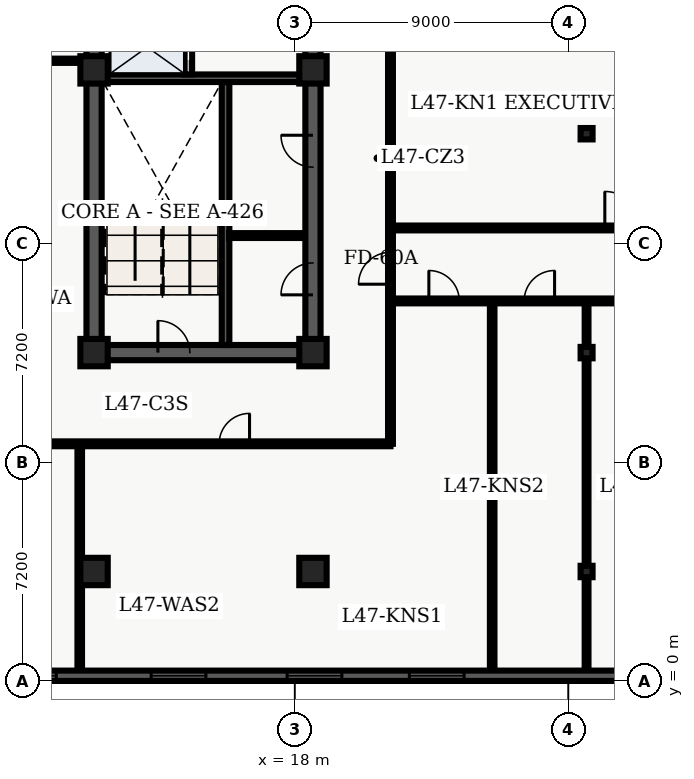
"""IFC4 building model, lengths in metres.
Left out: names, types, materials, properties, quantities, classifications, styles, units other than length and angle.
Written with IfcOpenShell. Run it as: python <this file> out.ifc"""

import sys

from ifc_helpers import new_model, entity, si_unit, converted_unit, direction, frame, origin_with_axes, origin_2d_with_axis, place, context, subcontext, project, spatial, polyline, rectangle, i_section, outline, extrude, element, fill, save


model = new_model("IFC4")
c1 = context("Model", 3, precision=1e-05, world=origin_with_axes(), true_north=direction((0.0, 1.0)))
c2 = subcontext(c1, "Body", "Model", "MODEL_VIEW")
j1 = project(units=[si_unit("LENGTHUNIT", "METRE"), converted_unit("PLANEANGLEUNIT", "DEGREE", entity("IfcPlaneAngleMeasure", 0.017), si_unit("PLANEANGLEUNIT", "RADIAN"), dimensions=[0, 0, 0, 0, 0, 0, 0])], contexts=[c1])
p1 = place(None, origin_with_axes())
s1 = spatial("IfcSite", under=j1, at=p1, CompositionType="ELEMENT")
p2 = place(p1, origin_with_axes())
s2 = spatial("IfcBuilding", under=s1, at=p2, CompositionType="ELEMENT")
p3 = place(p2, frame((0.0, 0.0, 192.6), z_axis=(0.0, 0.0, 1.0), x_axis=(1.0, 0.0, 0.0)))
s3 = spatial("IfcBuildingStorey", under=s2, at=p3, CompositionType="ELEMENT", Elevation=192.6)
p4 = place(p3, frame((11.4, 10.8, 0.0), z_axis=(0.0, 0.0, 1.0), x_axis=(0.0, 1.0, 0.0)))
e1 = element("IfcWall", 1, at=p4, inside=s3, PredefinedType="SHEAR", context=c2, shape_type="SweptSolid", body=[
    extrude(outline(polyline([(0.0, -0.25), (27.0, -0.25), (27.0, 0.25), (0.0, 0.25), (0.0, -0.25)])), origin_with_axes(), (0.0, 0.0, 1.0), 3.66),
])
p5 = place(p3, frame((11.4, 10.8, 0.0), z_axis=(0.0, 0.0, 1.0), x_axis=(1.0, 0.0, 0.0)))
e2 = element("IfcWall", 2, at=p5, inside=s3, PredefinedType="SHEAR", context=c2, shape_type="SweptSolid", body=[
    extrude(outline(polyline([(0.0, -0.25), (7.2, -0.25), (7.2, 0.25), (0.0, 0.25), (0.0, -0.25)])), origin_with_axes(), (0.0, 0.0, 1.0), 3.66),
])
p6 = place(p5, frame((2.625, 0.0, 0.0), z_axis=(0.0, 0.0, 1.0), x_axis=(1.0, 0.0, 0.0)))
e3 = element("IfcOpeningElement", 3, at=p6, cuts=e2, PredefinedType="OPENING", context=c2, shape_type="SweptSolid", body=[
    extrude(rectangle(XDim=1.05, YDim=0.52, at=origin_2d_with_axis()), origin_with_axes(), (0.0, 0.0, 1.0), 2.15),
])
p7 = place(p3, frame((18.6, 10.8, 0.0), z_axis=(0.0, 0.0, 1.0), x_axis=(0.0, 1.0, 0.0)))
e4 = element("IfcWall", 4, at=p7, inside=s3, PredefinedType="SHEAR", context=c2, shape_type="SweptSolid", body=[
    extrude(outline(polyline([(0.0, -0.25), (13.5, -0.25), (13.5, 0.25), (0.0, 0.25), (0.0, -0.25)])), origin_with_axes(), (0.0, 0.0, 1.0), 3.66),
])
p8 = place(p7, frame((11.125, 0.0, 0.0), z_axis=(0.0, 0.0, 1.0), x_axis=(1.0, 0.0, 0.0)))
e5 = element("IfcOpeningElement", 5, at=p8, cuts=e4, PredefinedType="OPENING", context=c2, shape_type="SweptSolid", body=[
    extrude(rectangle(XDim=1.05, YDim=0.52, at=origin_2d_with_axis()), origin_with_axes(), (0.0, 0.0, 1.0), 2.15),
])
p9 = place(p7, frame((2.425, 0.0, 0.0), z_axis=(0.0, 0.0, 1.0), x_axis=(1.0, 0.0, 0.0)))
e6 = element("IfcOpeningElement", 6, at=p9, cuts=e4, PredefinedType="OPENING", context=c2, shape_type="SweptSolid", body=[
    extrude(rectangle(XDim=1.05, YDim=0.52, at=origin_2d_with_axis()), origin_with_axes(), (0.0, 0.0, 1.0), 2.15),
])
p10 = place(p7, frame((6.625, 0.0, 0.0), z_axis=(0.0, 0.0, 1.0), x_axis=(1.0, 0.0, 0.0)))
e7 = element("IfcOpeningElement", 7, at=p10, cuts=e4, PredefinedType="OPENING", context=c2, shape_type="SweptSolid", body=[
    extrude(rectangle(XDim=1.05, YDim=0.52, at=origin_2d_with_axis()), origin_with_axes(), (0.0, 0.0, 1.0), 2.15),
])
p11 = place(p3, frame((15.725, 11.05, 0.0), z_axis=(0.0, 0.0, 1.0), x_axis=(0.0, 1.0, 0.0)))
e8 = element("IfcWall", 8, at=p11, inside=s3, PredefinedType="SHEAR", context=c2, shape_type="SweptSolid", body=[
    extrude(outline(polyline([(0.0, -0.125), (8.65, -0.125), (8.65, 0.125), (0.0, 0.125), (0.0, -0.125)])), origin_with_axes(), (0.0, 0.0, 1.0), 3.66),
])
p12 = place(p3, frame((11.65, 19.825, 0.0), z_axis=(0.0, 0.0, 1.0), x_axis=(1.0, 0.0, 0.0)))
e9 = element("IfcWall", 9, at=p12, inside=s3, PredefinedType="SHEAR", context=c2, shape_type="SweptSolid", body=[
    extrude(outline(polyline([(0.0, -0.125), (6.7, -0.125), (6.7, 0.125), (0.0, 0.125), (0.0, -0.125)])), origin_with_axes(), (0.0, 0.0, 1.0), 3.66),
])
p13 = place(p3, frame((14.5, 19.95, 0.0), z_axis=(0.0, 0.0, 1.0), x_axis=(0.0, 1.0, 0.0)))
e10 = element("IfcWall", 10, at=p13, inside=s3, PredefinedType="SOLIDWALL", context=c2, shape_type="SweptSolid", body=[
    extrude(outline(polyline([(0.0, -0.125), (6.25, -0.125), (6.25, 0.125), (0.0, 0.125), (0.0, -0.125)])), origin_with_axes(), (0.0, 0.0, 1.0), 2.7),
])
p14 = place(p13, frame((1.025, 0.0, 0.0), z_axis=(0.0, 0.0, 1.0), x_axis=(1.0, 0.0, 0.0)))
e11 = element("IfcOpeningElement", 11, at=p14, cuts=e10, PredefinedType="OPENING", context=c2, shape_type="SweptSolid", body=[
    extrude(rectangle(XDim=1.1, YDim=0.27, at=origin_2d_with_axis()), origin_with_axes(), (0.0, 0.0, 1.0), 2.15),
])
p15 = place(p13, frame((2.975, 0.0, 0.0), z_axis=(0.0, 0.0, 1.0), x_axis=(1.0, 0.0, 0.0)))
e12 = element("IfcOpeningElement", 12, at=p15, cuts=e10, PredefinedType="OPENING", context=c2, shape_type="SweptSolid", body=[
    extrude(rectangle(XDim=1.1, YDim=0.27, at=origin_2d_with_axis()), origin_with_axes(), (0.0, 0.0, 1.0), 2.15),
])
p16 = place(p13, frame((5.425, 0.0, 0.0), z_axis=(0.0, 0.0, 1.0), x_axis=(1.0, 0.0, 0.0)))
e13 = element("IfcOpeningElement", 13, at=p16, cuts=e10, PredefinedType="OPENING", context=c2, shape_type="SweptSolid", body=[
    extrude(rectangle(XDim=1.2, YDim=0.27, at=origin_2d_with_axis()), origin_with_axes(), (0.0, 0.0, 1.0), 2.15),
])
for number, where, z_axis, x_axis in (
    (14, (11.4, 3.6, 0.0), (0.0, 0.0, 1.0), (1.0, 0.0, 0.0)),
    (15, (11.4, 10.8, 0.0), (0.0, 0.0, 1.0), (1.0, 0.0, 0.0)),
    (16, (11.4, 20.1, 0.0), (0.0, 0.0, 1.0), (1.0, 0.0, 0.0)),
    (17, (18.6, 3.6, 0.0), (0.0, 0.0, 1.0), (1.0, 0.0, 0.0)),
    (18, (18.6, 10.8, 0.0), (0.0, 0.0, 1.0), (1.0, 0.0, 0.0)),
    (19, (18.6, 20.1, 0.0), (0.0, 0.0, 1.0), (1.0, 0.0, 0.0)),
):
    element("IfcColumn", number, at=place(p3, frame(where, z_axis=z_axis, x_axis=x_axis)), inside=s3, PredefinedType="COLUMN", context=c2, shape_type="SweptSolid", body=[
        extrude(rectangle(XDim=0.9, YDim=0.9, at=origin_2d_with_axis()), origin_with_axes(), (0.0, 0.0, 1.0), 3.9),
    ])
for number, where, z_axis, x_axis in (
    (20, (27.6, 3.6, 0.0), (0.0, 0.0, 1.0), (1.0, 0.0, 0.0)),
    (21, (27.6, 10.8, 0.0), (0.0, 0.0, 1.0), (1.0, 0.0, 0.0)),
    (22, (27.6, 18.0, 0.0), (0.0, 0.0, 1.0), (1.0, 0.0, 0.0)),
):
    element("IfcColumn", number, at=place(p3, frame(where, z_axis=z_axis, x_axis=x_axis)), inside=s3, PredefinedType="COLUMN", context=c2, shape_type="SweptSolid", body=[
        extrude(i_section(OverallWidth=0.394, OverallDepth=0.375, WebThickness=0.017, FlangeThickness=0.028, FilletRadius=0.02, at=origin_2d_with_axis()), origin_with_axes(), (0.0, 0.0, 1.0), 3.9),
    ])
p17 = place(p3, frame((15.84, 14.65, 0.0), z_axis=(0.0, 0.0, 1.0), x_axis=(1.0, 0.0, 0.0)))
e23 = element("IfcWall", 23, at=p17, inside=s3, PredefinedType="PARTITIONING", context=c2, shape_type="SweptSolid", body=[
    extrude(outline(polyline([(0.0, -0.08), (2.46, -0.08), (2.46, 0.08), (0.0, 0.08), (0.0, -0.08)])), origin_with_axes(), (0.0, 0.0, 1.0), 2.7),
])
p18 = place(p3, frame((9.52, 20.4, 0.0), z_axis=(0.0, 0.0, 1.0), x_axis=(1.0, 0.0, 0.0)))
e24 = element("IfcWall", 24, at=p18, inside=s3, PredefinedType="PARTITIONING", context=c2, shape_type="SweptSolid", body=[
    extrude(outline(polyline([(0.0, -0.07), (1.58, -0.07), (1.58, 0.07), (0.0, 0.07), (0.0, -0.07)])), origin_with_axes(), (0.0, 0.0, 1.0), 2.7),
])
p19 = place(p3, frame((2.6, 7.8, 0.0), z_axis=(0.0, 0.0, 1.0), x_axis=(1.0, 0.0, 0.0)))
e25 = element("IfcWall", 25, at=p19, inside=s3, PredefinedType="PARTITIONING", context=c2, shape_type="SweptSolid", body=[
    extrude(outline(polyline([(0.0, -0.08), (18.55, -0.08), (18.55, 0.08), (0.0, 0.08), (0.0, -0.08)])), origin_with_axes(), (0.0, 0.0, 1.0), 2.7),
])
p20 = place(p19, frame((5.04, 0.0, 0.0), z_axis=(0.0, 0.0, 1.0), x_axis=(1.0, 0.0, 0.0)))
e26 = element("IfcOpeningElement", 26, at=p20, cuts=e25, PredefinedType="OPENING", context=c2, shape_type="SweptSolid", body=[
    extrude(rectangle(XDim=1.2, YDim=0.18, at=origin_2d_with_axis()), origin_with_axes(), (0.0, 0.0, 1.0), 2.2),
])
p21 = place(p19, frame((13.415, 0.0, 0.0), z_axis=(0.0, 0.0, 1.0), x_axis=(1.0, 0.0, 0.0)))
e27 = element("IfcOpeningElement", 27, at=p21, cuts=e25, PredefinedType="OPENING", context=c2, shape_type="SweptSolid", body=[
    extrude(rectangle(XDim=1.0, YDim=0.18, at=origin_2d_with_axis()), origin_with_axes(), (0.0, 0.0, 1.0), 2.15),
])
p22 = place(p3, frame((21.15, 7.8, 0.0), z_axis=(0.0, 0.0, 1.0), x_axis=(0.0, 1.0, 0.0)))
e28 = element("IfcWall", 28, at=p22, inside=s3, PredefinedType="PARTITIONING", context=c2, shape_type="SweptSolid", body=[
    extrude(outline(polyline([(0.0, -0.08), (32.7, -0.08), (32.7, 0.08), (0.0, 0.08), (0.0, -0.08)])), origin_with_axes(), (0.0, 0.0, 1.0), 2.7),
])
p23 = place(p22, frame((15.589, 0.0, 0.0), z_axis=(0.0, 0.0, 1.0), x_axis=(1.0, 0.0, 0.0)))
e29 = element("IfcOpeningElement", 29, at=p23, cuts=e28, PredefinedType="OPENING", context=c2, shape_type="SweptSolid", body=[
    extrude(rectangle(XDim=1.0, YDim=0.18, at=origin_2d_with_axis()), origin_with_axes(), (0.0, 0.0, 1.0), 2.15),
])
p24 = place(p22, frame((19.026, 0.0, 0.0), z_axis=(0.0, 0.0, 1.0), x_axis=(1.0, 0.0, 0.0)))
e30 = element("IfcOpeningElement", 30, at=p24, cuts=e28, PredefinedType="OPENING", context=c2, shape_type="SweptSolid", body=[
    extrude(rectangle(XDim=1.0, YDim=0.18, at=origin_2d_with_axis()), origin_with_axes(), (0.0, 0.0, 1.0), 2.15),
])
p25 = place(p22, frame((22.849, 0.0, 0.0), z_axis=(0.0, 0.0, 1.0), x_axis=(1.0, 0.0, 0.0)))
e31 = element("IfcOpeningElement", 31, at=p25, cuts=e28, PredefinedType="OPENING", context=c2, shape_type="SweptSolid", body=[
    extrude(rectangle(XDim=1.0, YDim=0.18, at=origin_2d_with_axis()), origin_with_axes(), (0.0, 0.0, 1.0), 2.15),
])
p26 = place(p22, frame((27.204, 0.0, 0.0), z_axis=(0.0, 0.0, 1.0), x_axis=(1.0, 0.0, 0.0)))
e32 = element("IfcOpeningElement", 32, at=p26, cuts=e28, PredefinedType="OPENING", context=c2, shape_type="SweptSolid", body=[
    extrude(rectangle(XDim=1.0, YDim=0.18, at=origin_2d_with_axis()), origin_with_axes(), (0.0, 0.0, 1.0), 2.15),
])
p27 = place(p22, frame((31.042, 0.0, 0.0), z_axis=(0.0, 0.0, 1.0), x_axis=(1.0, 0.0, 0.0)))
e33 = element("IfcOpeningElement", 33, at=p27, cuts=e28, PredefinedType="OPENING", context=c2, shape_type="SweptSolid", body=[
    extrude(rectangle(XDim=1.0, YDim=0.18, at=origin_2d_with_axis()), origin_with_axes(), (0.0, 0.0, 1.0), 2.15),
])
p28 = place(p22, frame((5.775, 0.0, 0.0), z_axis=(0.0, 0.0, 1.0), x_axis=(1.0, 0.0, 0.0)))
e34 = element("IfcOpeningElement", 34, at=p28, cuts=e28, PredefinedType="OPENING", context=c2, shape_type="SweptSolid", body=[
    extrude(rectangle(XDim=1.05, YDim=0.18, at=origin_2d_with_axis()), origin_with_axes(), (0.0, 0.0, 1.0), 2.15),
])
p29 = place(p3, frame((10.929, 0.335, 0.0), z_axis=(0.0, 0.0, 1.0), x_axis=(0.0, 1.0, 0.0)))
e35 = element("IfcWall", 35, at=p29, inside=s3, PredefinedType="PARTITIONING", context=c2, shape_type="SweptSolid", body=[
    extrude(outline(polyline([(0.0, -0.075), (7.365, -0.075), (7.365, 0.075), (0.0, 0.075), (0.0, -0.075)])), origin_with_axes(), (0.0, 0.0, 1.0), 2.7),
])
p30 = place(p3, frame((21.15, 12.5, 0.0), z_axis=(0.0, 0.0, 1.0), x_axis=(1.0, 0.0, 0.0)))
e36 = element("IfcWall", 36, at=p30, inside=s3, PredefinedType="PARTITIONING", context=c2, shape_type="SweptSolid", body=[
    extrude(outline(polyline([(0.0, -0.08), (15.2, -0.08), (15.2, 0.08), (0.0, 0.08), (0.0, -0.08)])), origin_with_axes(), (0.0, 0.0, 1.0), 2.7),
])
p31 = place(p30, frame((1.762, 0.0, 0.0), z_axis=(0.0, 0.0, 1.0), x_axis=(1.0, 0.0, 0.0)))
e37 = element("IfcOpeningElement", 37, at=p31, cuts=e36, PredefinedType="OPENING", context=c2, shape_type="SweptSolid", body=[
    extrude(rectangle(XDim=1.0, YDim=0.18, at=origin_2d_with_axis()), origin_with_axes(), (0.0, 0.0, 1.0), 2.15),
])
p32 = place(p30, frame((4.897, 0.0, 0.0), z_axis=(0.0, 0.0, 1.0), x_axis=(1.0, 0.0, 0.0)))
e38 = element("IfcOpeningElement", 38, at=p32, cuts=e36, PredefinedType="OPENING", context=c2, shape_type="SweptSolid", body=[
    extrude(rectangle(XDim=1.0, YDim=0.18, at=origin_2d_with_axis()), origin_with_axes(), (0.0, 0.0, 1.0), 2.15),
])
p33 = place(p30, frame((8.527, 0.0, 0.0), z_axis=(0.0, 0.0, 1.0), x_axis=(1.0, 0.0, 0.0)))
e39 = element("IfcOpeningElement", 39, at=p33, cuts=e36, PredefinedType="OPENING", context=c2, shape_type="SweptSolid", body=[
    extrude(rectangle(XDim=1.0, YDim=0.18, at=origin_2d_with_axis()), origin_with_axes(), (0.0, 0.0, 1.0), 2.15),
])
p34 = place(p30, frame((12.863, 0.0, 0.0), z_axis=(0.0, 0.0, 1.0), x_axis=(1.0, 0.0, 0.0)))
e40 = element("IfcOpeningElement", 40, at=p34, cuts=e36, PredefinedType="OPENING", context=c2, shape_type="SweptSolid", body=[
    extrude(rectangle(XDim=1.0, YDim=0.18, at=origin_2d_with_axis()), origin_with_axes(), (0.0, 0.0, 1.0), 2.15),
])
p35 = place(p3, frame((21.15, 14.9, 0.0), z_axis=(0.0, 0.0, 1.0), x_axis=(1.0, 0.0, 0.0)))
e41 = element("IfcWall", 41, at=p35, inside=s3, PredefinedType="PARTITIONING", context=c2, shape_type="SweptSolid", body=[
    extrude(outline(polyline([(0.0, -0.08), (15.2, -0.08), (15.2, 0.08), (0.0, 0.08), (0.0, -0.08)])), origin_with_axes(), (0.0, 0.0, 1.0), 2.7),
])
p36 = place(p35, frame((7.65, 0.0, 0.0), z_axis=(0.0, 0.0, 1.0), x_axis=(1.0, 0.0, 0.0)))
e42 = element("IfcOpeningElement", 42, at=p36, cuts=e41, PredefinedType="OPENING", context=c2, shape_type="SweptSolid", body=[
    extrude(rectangle(XDim=1.2, YDim=0.18, at=origin_2d_with_axis()), origin_with_axes(), (0.0, 0.0, 1.0), 2.2),
])
p37 = place(p3, frame((24.495, 0.335, 0.0), z_axis=(0.0, 0.0, 1.0), x_axis=(0.0, 1.0, 0.0)))
e43 = element("IfcWall", 43, at=p37, inside=s3, PredefinedType="PARTITIONING", context=c2, shape_type="SweptSolid", body=[
    extrude(outline(polyline([(0.0, -0.075), (12.045, -0.075), (12.045, 0.075), (0.0, 0.075), (0.0, -0.075)])), origin_with_axes(), (0.0, 0.0, 1.0), 2.7),
])
p38 = place(p3, frame((27.6, 0.335, 0.0), z_axis=(0.0, 0.0, 1.0), x_axis=(0.0, 1.0, 0.0)))
e44 = element("IfcWall", 44, at=p38, inside=s3, PredefinedType="PARTITIONING", context=c2, shape_type="SweptSolid", body=[
    extrude(outline(polyline([(0.0, -0.062), (12.045, -0.062), (12.045, 0.062), (0.0, 0.062), (0.0, -0.062)])), origin_with_axes(), (0.0, 0.0, 1.0), 2.7),
])
p39 = place(p3, frame((57.26, 0.17, 0.0), z_axis=(0.0, 0.0, 1.0), x_axis=(-1.0, 0.0, 0.0)))
e45 = element("IfcWall", 45, at=p39, inside=s3, PredefinedType="SOLIDWALL", context=c2, shape_type="SweptSolid", body=[
    extrude(outline(polyline([(0.0, -0.17), (54.86, -0.17), (54.86, 0.17), (0.0, 0.17), (0.0, -0.17)])), origin_with_axes(), (0.0, 0.0, 1.0), 3.66),
])
p40 = place(p39, frame((2.836, 0.0, 0.45), z_axis=(0.0, 0.0, 1.0), x_axis=(1.0, 0.0, 0.0)))
e46 = element("IfcOpeningElement", 46, at=p40, cuts=e45, PredefinedType="OPENING", context=c2, shape_type="SweptSolid", body=[
    extrude(rectangle(XDim=1.8, YDim=0.36, at=origin_2d_with_axis()), origin_with_axes(), (0.0, 0.0, 1.0), 2.1),
])
p41 = place(p39, frame((7.307, 0.0, 0.45), z_axis=(0.0, 0.0, 1.0), x_axis=(1.0, 0.0, 0.0)))
e47 = element("IfcOpeningElement", 47, at=p41, cuts=e45, PredefinedType="OPENING", context=c2, shape_type="SweptSolid", body=[
    extrude(rectangle(XDim=1.8, YDim=0.36, at=origin_2d_with_axis()), origin_with_axes(), (0.0, 0.0, 1.0), 2.1),
])
p42 = place(p39, frame((11.779, 0.0, 0.45), z_axis=(0.0, 0.0, 1.0), x_axis=(1.0, 0.0, 0.0)))
e48 = element("IfcOpeningElement", 48, at=p42, cuts=e45, PredefinedType="OPENING", context=c2, shape_type="SweptSolid", body=[
    extrude(rectangle(XDim=1.8, YDim=0.36, at=origin_2d_with_axis()), origin_with_axes(), (0.0, 0.0, 1.0), 2.1),
])
p43 = place(p39, frame((16.251, 0.0, 0.45), z_axis=(0.0, 0.0, 1.0), x_axis=(1.0, 0.0, 0.0)))
e49 = element("IfcOpeningElement", 49, at=p43, cuts=e45, PredefinedType="OPENING", context=c2, shape_type="SweptSolid", body=[
    extrude(rectangle(XDim=1.8, YDim=0.36, at=origin_2d_with_axis()), origin_with_axes(), (0.0, 0.0, 1.0), 2.1),
])
p44 = place(p39, frame((20.723, 0.0, 0.45), z_axis=(0.0, 0.0, 1.0), x_axis=(1.0, 0.0, 0.0)))
e50 = element("IfcOpeningElement", 50, at=p44, cuts=e45, PredefinedType="OPENING", context=c2, shape_type="SweptSolid", body=[
    extrude(rectangle(XDim=1.8, YDim=0.36, at=origin_2d_with_axis()), origin_with_axes(), (0.0, 0.0, 1.0), 2.1),
])
p45 = place(p39, frame((34.588, 0.0, 0.45), z_axis=(0.0, 0.0, 1.0), x_axis=(1.0, 0.0, 0.0)))
e51 = element("IfcOpeningElement", 51, at=p45, cuts=e45, PredefinedType="OPENING", context=c2, shape_type="SweptSolid", body=[
    extrude(rectangle(XDim=1.8, YDim=0.36, at=origin_2d_with_axis()), origin_with_axes(), (0.0, 0.0, 1.0), 2.1),
])
p46 = place(p39, frame((38.609, 0.0, 0.45), z_axis=(0.0, 0.0, 1.0), x_axis=(1.0, 0.0, 0.0)))
e52 = element("IfcOpeningElement", 52, at=p46, cuts=e45, PredefinedType="OPENING", context=c2, shape_type="SweptSolid", body=[
    extrude(rectangle(XDim=1.8, YDim=0.36, at=origin_2d_with_axis()), origin_with_axes(), (0.0, 0.0, 1.0), 2.1),
])
p47 = place(p39, frame((43.081, 0.0, 0.45), z_axis=(0.0, 0.0, 1.0), x_axis=(1.0, 0.0, 0.0)))
e53 = element("IfcOpeningElement", 53, at=p47, cuts=e45, PredefinedType="OPENING", context=c2, shape_type="SweptSolid", body=[
    extrude(rectangle(XDim=1.8, YDim=0.36, at=origin_2d_with_axis()), origin_with_axes(), (0.0, 0.0, 1.0), 2.1),
])
p48 = place(p39, frame((48.003, 0.0, 0.45), z_axis=(0.0, 0.0, 1.0), x_axis=(1.0, 0.0, 0.0)))
e54 = element("IfcOpeningElement", 54, at=p48, cuts=e45, PredefinedType="OPENING", context=c2, shape_type="SweptSolid", body=[
    extrude(rectangle(XDim=1.8, YDim=0.36, at=origin_2d_with_axis()), origin_with_axes(), (0.0, 0.0, 1.0), 2.1),
])
p49 = place(p39, frame((52.024, 0.0, 0.45), z_axis=(0.0, 0.0, 1.0), x_axis=(1.0, 0.0, 0.0)))
e55 = element("IfcOpeningElement", 55, at=p49, cuts=e45, PredefinedType="OPENING", context=c2, shape_type="SweptSolid", body=[
    extrude(rectangle(XDim=1.8, YDim=0.36, at=origin_2d_with_axis()), origin_with_axes(), (0.0, 0.0, 1.0), 2.1),
])
p50 = place(p13, frame((1.025, 0.0, 0.0), z_axis=(0.0, 0.0, 1.0), x_axis=(1.0, 0.0, 0.0)))
e56 = element("IfcDoor", 56, at=p50, inside=s3, OperationType="SLIDING_TO_LEFT", PredefinedType="DOOR", context=c2, shape_type="SweptSolid", body=[
    extrude(rectangle(XDim=1.1, YDim=0.09, at=origin_2d_with_axis()), origin_with_axes(), (0.0, 0.0, 1.0), 2.15),
])
fill(e11, e56)
p51 = place(p5, frame((2.625, 0.0, 0.0), z_axis=(0.0, 0.0, 1.0), x_axis=(1.0, 0.0, 0.0)))
e57 = element("IfcDoor", 57, at=p51, inside=s3, OperationType="SINGLE_SWING_LEFT", PredefinedType="DOOR", context=c2, shape_type="SweptSolid", body=[
    extrude(rectangle(XDim=1.05, YDim=0.09, at=origin_2d_with_axis()), origin_with_axes(), (0.0, 0.0, 1.0), 2.15),
])
fill(e3, e57)
p52 = place(p7, frame((2.425, 0.0, 0.0), z_axis=(0.0, 0.0, 1.0), x_axis=(1.0, 0.0, 0.0)))
e58 = element("IfcDoor", 58, at=p52, inside=s3, OperationType="SINGLE_SWING_LEFT", PredefinedType="DOOR", context=c2, shape_type="SweptSolid", body=[
    extrude(rectangle(XDim=1.05, YDim=0.09, at=origin_2d_with_axis()), origin_with_axes(), (0.0, 0.0, 1.0), 2.15),
])
fill(e6, e58)
p53 = place(p7, frame((6.625, 0.0, 0.0), z_axis=(0.0, 0.0, 1.0), x_axis=(1.0, 0.0, 0.0)))
e59 = element("IfcDoor", 59, at=p53, inside=s3, OperationType="SINGLE_SWING_RIGHT", PredefinedType="DOOR", context=c2, shape_type="SweptSolid", body=[
    extrude(rectangle(XDim=1.05, YDim=0.09, at=origin_2d_with_axis()), origin_with_axes(), (0.0, 0.0, 1.0), 2.15),
])
fill(e7, e59)
p54 = place(p19, frame((13.415, 0.0, 0.0), z_axis=(0.0, 0.0, 1.0), x_axis=(1.0, 0.0, 0.0)))
e60 = element("IfcDoor", 60, at=p54, inside=s3, OperationType="SINGLE_SWING_RIGHT", PredefinedType="DOOR", context=c2, shape_type="SweptSolid", body=[
    extrude(rectangle(XDim=1.0, YDim=0.09, at=origin_2d_with_axis()), origin_with_axes(), (0.0, 0.0, 1.0), 2.15),
])
fill(e27, e60)
p55 = place(p22, frame((5.775, 0.0, 0.0), z_axis=(0.0, 0.0, 1.0), x_axis=(1.0, 0.0, 0.0)))
e61 = element("IfcDoor", 61, at=p55, inside=s3, OperationType="SINGLE_SWING_LEFT", PredefinedType="DOOR", context=c2, shape_type="SweptSolid", body=[
    extrude(rectangle(XDim=1.05, YDim=0.09, at=origin_2d_with_axis()), origin_with_axes(), (0.0, 0.0, 1.0), 2.15),
])
fill(e34, e61)
p56 = place(p30, frame((1.762, 0.0, 0.0), z_axis=(0.0, 0.0, 1.0), x_axis=(1.0, 0.0, 0.0)))
e62 = element("IfcDoor", 62, at=p56, inside=s3, OperationType="SINGLE_SWING_LEFT", PredefinedType="DOOR", context=c2, shape_type="SweptSolid", body=[
    extrude(rectangle(XDim=1.0, YDim=0.09, at=origin_2d_with_axis()), origin_with_axes(), (0.0, 0.0, 1.0), 2.15),
])
fill(e37, e62)
p57 = place(p30, frame((4.897, 0.0, 0.0), z_axis=(0.0, 0.0, 1.0), x_axis=(1.0, 0.0, 0.0)))
e63 = element("IfcDoor", 63, at=p57, inside=s3, OperationType="SINGLE_SWING_RIGHT", PredefinedType="DOOR", context=c2, shape_type="SweptSolid", body=[
    extrude(rectangle(XDim=1.0, YDim=0.09, at=origin_2d_with_axis()), origin_with_axes(), (0.0, 0.0, 1.0), 2.15),
])
fill(e38, e63)
p58 = place(p35, frame((7.65, 0.0, 0.0), z_axis=(0.0, 0.0, 1.0), x_axis=(1.0, 0.0, 0.0)))
e64 = element("IfcDoor", 64, at=p58, inside=s3, OperationType="SINGLE_SWING_LEFT", PredefinedType="DOOR", context=c2, shape_type="SweptSolid", body=[
    extrude(rectangle(XDim=1.2, YDim=0.09, at=origin_2d_with_axis()), origin_with_axes(), (0.0, 0.0, 1.0), 2.2),
])
fill(e42, e64)
p59 = place(p39, frame((34.588, 0.0, 0.45), z_axis=(0.0, 0.0, 1.0), x_axis=(1.0, 0.0, 0.0)))
e65 = element("IfcWindow", 65, at=p59, inside=s3, PredefinedType="WINDOW", context=c2, shape_type="SweptSolid", body=[
    extrude(rectangle(XDim=1.8, YDim=0.09, at=origin_2d_with_axis()), origin_with_axes(), (0.0, 0.0, 1.0), 2.1),
])
fill(e51, e65)
p60 = place(p39, frame((38.609, 0.0, 0.45), z_axis=(0.0, 0.0, 1.0), x_axis=(1.0, 0.0, 0.0)))
e66 = element("IfcWindow", 66, at=p60, inside=s3, PredefinedType="WINDOW", context=c2, shape_type="SweptSolid", body=[
    extrude(rectangle(XDim=1.8, YDim=0.09, at=origin_2d_with_axis()), origin_with_axes(), (0.0, 0.0, 1.0), 2.1),
])
fill(e52, e66)
p61 = place(p39, frame((43.081, 0.0, 0.45), z_axis=(0.0, 0.0, 1.0), x_axis=(1.0, 0.0, 0.0)))
e67 = element("IfcWindow", 67, at=p61, inside=s3, PredefinedType="WINDOW", context=c2, shape_type="SweptSolid", body=[
    extrude(rectangle(XDim=1.8, YDim=0.09, at=origin_2d_with_axis()), origin_with_axes(), (0.0, 0.0, 1.0), 2.1),
])
fill(e53, e67)
p62 = place(p39, frame((48.003, 0.0, 0.45), z_axis=(0.0, 0.0, 1.0), x_axis=(1.0, 0.0, 0.0)))
e68 = element("IfcWindow", 68, at=p62, inside=s3, PredefinedType="WINDOW", context=c2, shape_type="SweptSolid", body=[
    extrude(rectangle(XDim=1.8, YDim=0.09, at=origin_2d_with_axis()), origin_with_axes(), (0.0, 0.0, 1.0), 2.1),
])
fill(e54, e68)
save(model, sys.argv[1])
